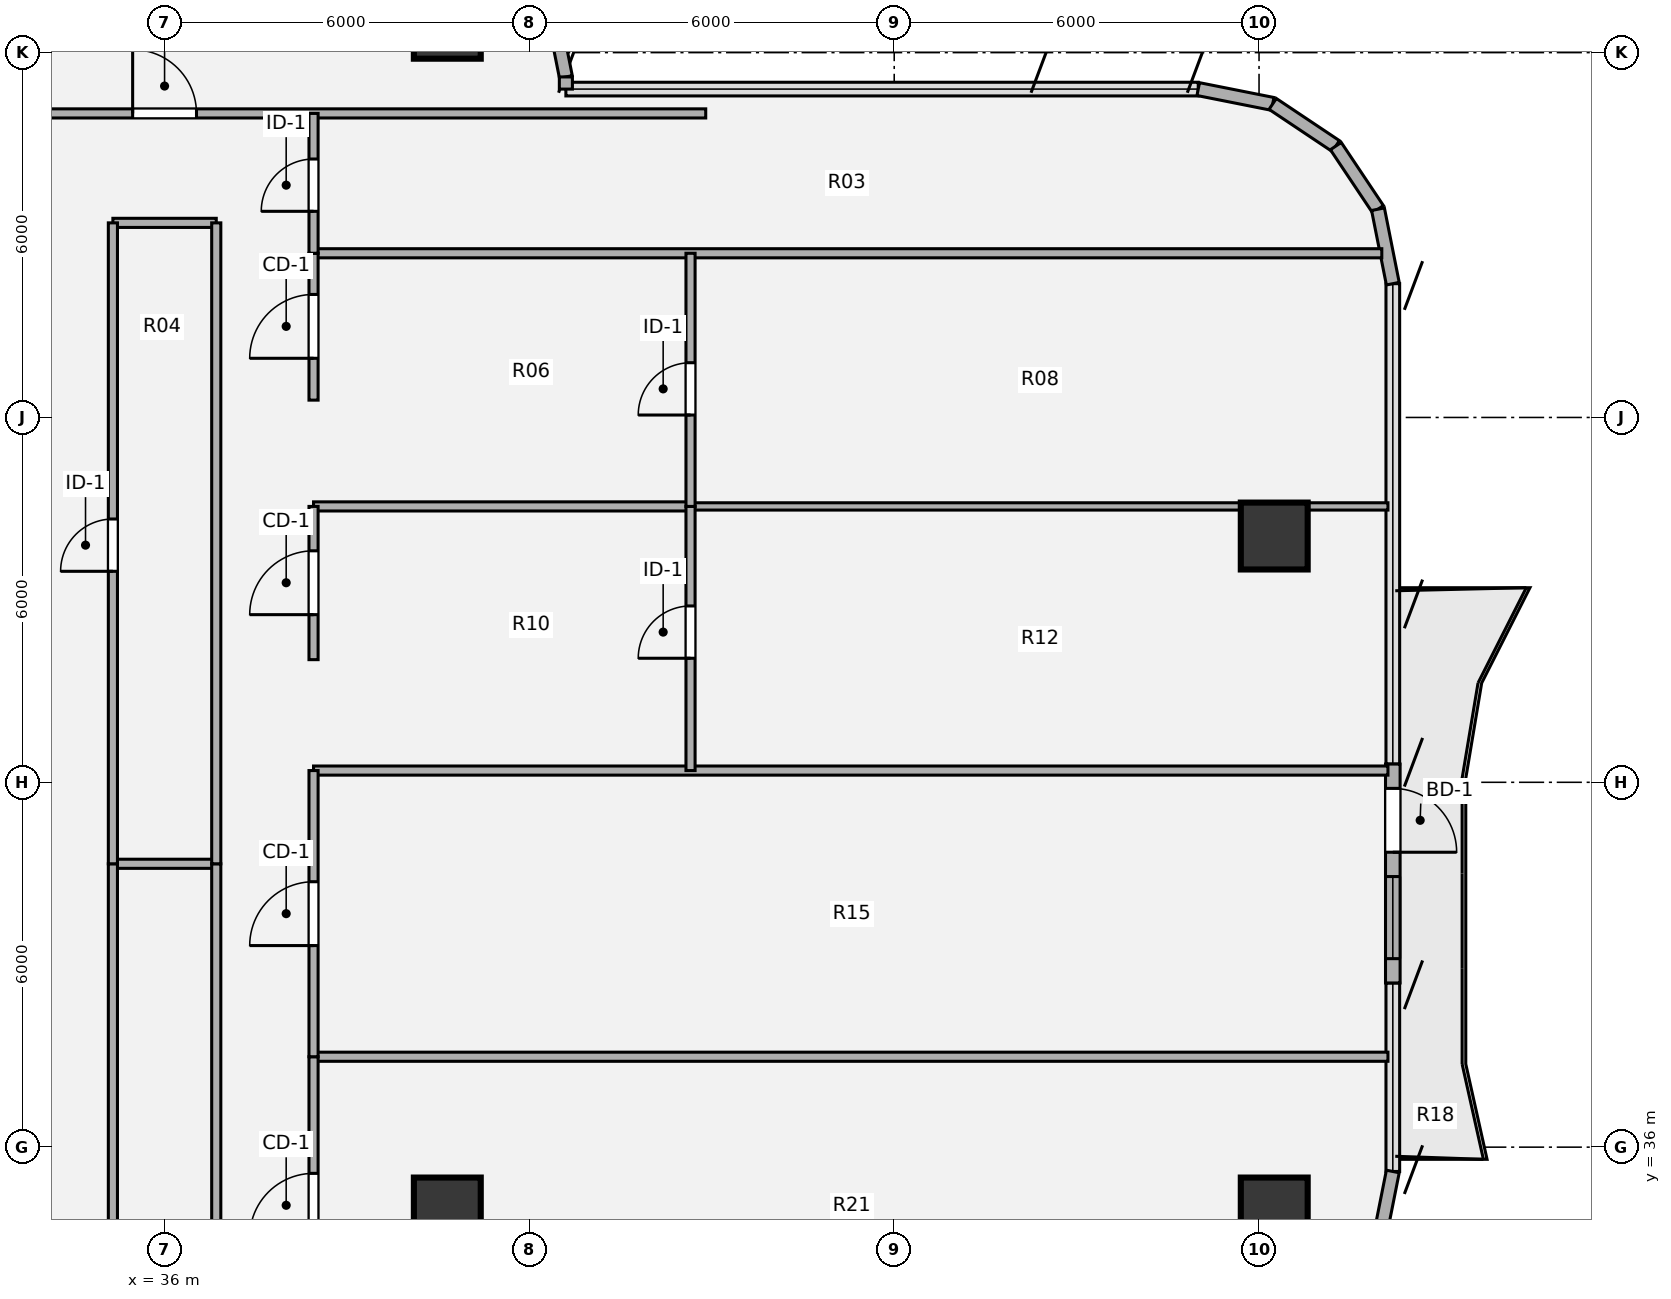
"""IFC4 building model, lengths in metres.
Left out: names, types, materials, properties, quantities, classifications, styles, units other than length and angle.
Written with IfcOpenShell. Run it as: python <this file> out.ifc"""

import sys

from ifc_helpers import new_model, si_unit, direction, frame, frame_2d, origin, origin_2d, place, context, subcontext, project, spatial, rectangle, hollow_circle, extrude, source, transform, mapped, element, fill, save


model = new_model("IFC4")
c1 = context("Model", 3, precision=1e-05, world=origin(), true_north=direction((0.0, 1.0)))
c2 = subcontext(c1, "Body", "Model", "MODEL_VIEW")
j1 = project(units=[si_unit("LENGTHUNIT", "METRE"), si_unit("PLANEANGLEUNIT", "RADIAN")], contexts=[c1])
p1 = place(None, origin())
s1 = spatial("IfcSite", under=j1, at=p1, CompositionType="ELEMENT")
p2 = place(p1, origin())
s2 = spatial("IfcBuilding", under=s1, at=p2, CompositionType="ELEMENT")
p3 = place(p2, frame((0.0, 0.0, 198.0)))
s3 = spatial("IfcBuildingStorey", under=s2, at=p3, CompositionType="ELEMENT", Elevation=198.0)
m1 = source(origin(), c2, "Body", "SweptSolid", [
    extrude(hollow_circle(Radius=0.55, WallThickness=0.04, at=origin_2d()), origin(), (0.0, 0.0, 1.0), 3.78),
])
for number, where, z_axis, x_axis in (
    (1, (54.25, 34.95, 0.0), (0.0, 0.0, 1.0), (1.0, 0.0, 0.0)),
    (2, (54.25, 46.05, 0.0), (0.0, 0.0, 1.0), (1.0, 0.0, 0.0)),
    (3, (40.65, 34.95, 0.0), (0.0, 0.0, 1.0), (1.0, 0.0, 0.0)),
    (4, (40.65, 54.45, 0.0), (0.0, 0.0, 1.0), (1.0, 0.0, 0.0)),
):
    element("IfcColumn", number, at=place(p3, frame(where, z_axis=z_axis, x_axis=x_axis)), inside=s3, PredefinedType="COLUMN", context=c2, shape_type="MappedRepresentation", body=[
        mapped(m1, transform((0.0, 0.0, 0.0), x_axis=(1.0, 0.0, 0.0), y_axis=(0.0, 1.0, 0.0), z_axis=(0.0, 0.0, 1.0), scale=1.0)),
    ])
p4 = place(p3, frame((42.387, 54.671, 0.0), z_axis=(0.0, 0.0, 1.0), x_axis=(0.195127417394, -0.980777900945, 0.0)))
e5 = element("IfcWall", 5, at=p4, inside=s3, PredefinedType="SOLIDWALL", context=c2, shape_type="SweptSolid", body=[
    extrude(rectangle(XDim=1.092, YDim=0.215, at=frame_2d((0.546, 0.0))), origin(), (0.0, 0.0, 1.0), 3.53),
])
p5 = place(p3, frame((42.6, 53.6, 0.0), z_axis=(0.0, 0.0, 1.0), x_axis=(0.0, -1.0, 0.0)))
e6 = element("IfcWall", 6, at=p5, inside=s3, PredefinedType="SOLIDWALL", context=c2, shape_type="SweptSolid", body=[
    extrude(rectangle(XDim=0.2, YDim=0.215, at=frame_2d((0.1, 0.0))), origin(), (0.0, 0.0, 1.0), 3.53),
])
for number, where, z_axis, x_axis in (
    (7, (53.0, 53.4, 0.0), (0.0, 0.0, 1.0), (0.981, -0.195, 0.0)),
    (8, (54.225, 53.156, 0.0), (0.0, 0.0, 1.0), (0.831, -0.556, 0.0)),
    (9, (55.263, 52.463, 0.0), (0.0, 0.0, 1.0), (0.556, -0.831, 0.0)),
    (10, (55.956, 51.425, 0.0), (0.0, 0.0, 1.0), (0.195, -0.981, 0.0)),
):
    element("IfcWall", number, at=place(p3, frame(where, z_axis=z_axis, x_axis=x_axis)), inside=s3, PredefinedType="SOLIDWALL", context=c2, shape_type="SweptSolid", body=[
        extrude(rectangle(XDim=1.249, YDim=0.215, at=frame_2d((0.624, 0.0))), origin(), (0.0, 0.0, 1.0), 3.53),
    ])
p6 = place(p3, frame((56.2, 42.3, 0.0), z_axis=(0.0, 0.0, 1.0), x_axis=(0.0, -1.0, 0.0)))
e11 = element("IfcWall", 11, at=p6, inside=s3, PredefinedType="SOLIDWALL", context=c2, shape_type="SweptSolid", body=[
    extrude(rectangle(XDim=3.6, YDim=0.24, at=frame_2d((1.8, 0.0))), origin(), (0.0, 0.0, 1.0), 3.53),
])
p7 = place(p6, frame((0.4, 0.0, 0.0)))
e12 = element("IfcOpeningElement", 12, at=p7, cuts=e11, PredefinedType="OPENING", context=c2, shape_type="SweptSolid", body=[
    extrude(rectangle(XDim=1.05, YDim=2.15, at=origin_2d()), frame((0.525, 0.13, 1.075), z_axis=(0.0, -1.0, 0.0), x_axis=(1.0, 0.0, 0.0)), (0.0, 0.0, 1.0), 0.26),
])
p8 = place(p6, frame((1.85, 0.0, 0.85)))
e13 = element("IfcOpeningElement", 13, at=p8, cuts=e11, PredefinedType="OPENING", context=c2, shape_type="SweptSolid", body=[
    extrude(rectangle(XDim=1.35, YDim=1.35, at=origin_2d()), frame((0.675, 0.13, 0.675), z_axis=(0.0, -1.0, 0.0), x_axis=(1.0, 0.0, 0.0)), (0.0, 0.0, 1.0), 0.26),
])
p9 = place(p3, frame((56.2, 35.6, 0.0), z_axis=(0.0, 0.0, 1.0), x_axis=(-0.195138390419, -0.980775717779, 0.0)))
e14 = element("IfcWall", 14, at=p9, inside=s3, PredefinedType="SOLIDWALL", context=c2, shape_type="SweptSolid", body=[
    extrude(rectangle(XDim=1.249, YDim=0.215, at=frame_2d((0.624, 0.0))), origin(), (0.0, 0.0, 1.0), 3.53),
])
p10 = place(p3, frame((38.45, 37.487, 0.0), z_axis=(0.0, 0.0, 1.0), x_axis=(1.0, 0.0, 0.0)))
e15 = element("IfcWall", 15, at=p10, inside=s3, PredefinedType="PARTITIONING", context=c2, shape_type="SweptSolid", body=[
    extrude(rectangle(XDim=17.67, YDim=0.15, at=frame_2d((8.835, 0.0))), origin(), (0.0, 0.0, 1.0), 3.055),
])
p11 = place(p3, frame((35.15, 40.66, 0.0), z_axis=(0.0, 0.0, 1.0), x_axis=(1.0, 0.0, 0.0)))
e16 = element("IfcWall", 16, at=p11, inside=s3, PredefinedType="PARTITIONING", context=c2, shape_type="SweptSolid", body=[
    extrude(rectangle(XDim=1.7, YDim=0.15, at=frame_2d((0.85, 0.0))), origin(), (0.0, 0.0, 1.0), 3.259),
])
p12 = place(p3, frame((38.45, 42.193, 0.0), z_axis=(0.0, 0.0, 1.0), x_axis=(1.0, 0.0, 0.0)))
e17 = element("IfcWall", 17, at=p12, inside=s3, PredefinedType="PARTITIONING", context=c2, shape_type="SweptSolid", body=[
    extrude(rectangle(XDim=17.67, YDim=0.15, at=frame_2d((8.835, 0.0))), origin(), (0.0, 0.0, 1.0), 2.982),
])
p13 = place(p3, frame((38.45, 46.537, 0.0), z_axis=(0.0, 0.0, 1.0), x_axis=(1.0, 0.0, 0.0)))
e18 = element("IfcWall", 18, at=p13, inside=s3, PredefinedType="PARTITIONING", context=c2, shape_type="SweptSolid", body=[
    extrude(rectangle(XDim=6.2, YDim=0.15, at=frame_2d((3.1, 0.0))), origin(), (0.0, 0.0, 1.0), 3.259),
])
p14 = place(p3, frame((44.65, 46.537, 0.0), z_axis=(0.0, 0.0, 1.0), x_axis=(1.0, 0.0, 0.0)))
e19 = element("IfcWall", 19, at=p14, inside=s3, PredefinedType="PARTITIONING", context=c2, shape_type="SweptSolid", body=[
    extrude(rectangle(XDim=11.47, YDim=0.12, at=frame_2d((5.735, 0.0))), origin(), (0.0, 0.0, 1.0), 3.5),
])
p15 = place(p3, frame((38.45, 50.7, 0.0), z_axis=(0.0, 0.0, 1.0), x_axis=(1.0, 0.0, 0.0)))
e20 = element("IfcWall", 20, at=p15, inside=s3, PredefinedType="PARTITIONING", context=c2, shape_type="SweptSolid", body=[
    extrude(rectangle(XDim=17.569, YDim=0.15, at=frame_2d((8.785, 0.0))), origin(), (0.0, 0.0, 1.0), 3.308),
])
p16 = place(p3, frame((35.15, 51.2, 0.0), z_axis=(0.0, 0.0, 1.0), x_axis=(1.0, 0.0, 0.0)))
e21 = element("IfcWall", 21, at=p16, inside=s3, PredefinedType="PARTITIONING", context=c2, shape_type="SweptSolid", body=[
    extrude(rectangle(XDim=1.7, YDim=0.15, at=frame_2d((0.85, 0.0))), origin(), (0.0, 0.0, 1.0), 3.308),
])
p17 = place(p3, frame((27.1, 53.0, 0.0), z_axis=(0.0, 0.0, 1.0), x_axis=(1.0, 0.0, 0.0)))
e22 = element("IfcWall", 22, at=p17, inside=s3, PredefinedType="PARTITIONING", context=c2, shape_type="SweptSolid", body=[
    extrude(rectangle(XDim=17.8, YDim=0.15, at=frame_2d((8.9, 0.0))), origin(), (0.0, 0.0, 1.0), 3.308),
])
p18 = place(p17, frame((8.375, 0.0, 0.0)))
e23 = element("IfcOpeningElement", 23, at=p18, cuts=e22, PredefinedType="OPENING", context=c2, shape_type="SweptSolid", body=[
    extrude(rectangle(XDim=1.05, YDim=2.1, at=origin_2d()), frame((0.525, 0.085, 1.05), z_axis=(0.0, -1.0, 0.0), x_axis=(1.0, 0.0, 0.0)), (0.0, 0.0, 1.0), 0.17),
])
p19 = place(p3, frame((35.15, 25.2, 0.0), z_axis=(0.0, 0.0, 1.0), x_axis=(0.0, 1.0, 0.0)))
e24 = element("IfcWall", 24, at=p19, inside=s3, PredefinedType="PARTITIONING", context=c2, shape_type="SweptSolid", body=[
    extrude(rectangle(XDim=15.46, YDim=0.15, at=frame_2d((7.73, 0.0))), origin(), (0.0, 0.0, 1.0), 3.5),
])
p20 = place(p3, frame((35.15, 40.66, 0.0), z_axis=(0.0, 0.0, 1.0), x_axis=(0.0, 1.0, 0.0)))
e25 = element("IfcWall", 25, at=p20, inside=s3, PredefinedType="PARTITIONING", context=c2, shape_type="SweptSolid", body=[
    extrude(rectangle(XDim=10.54, YDim=0.15, at=frame_2d((5.27, 0.0))), origin(), (0.0, 0.0, 1.0), 3.5),
])
p21 = place(p20, frame((4.81, 0.0, 0.0)))
e26 = element("IfcOpeningElement", 26, at=p21, cuts=e25, PredefinedType="OPENING", context=c2, shape_type="SweptSolid", body=[
    extrude(rectangle(XDim=0.86, YDim=2.1, at=origin_2d()), frame((0.43, 0.085, 1.05), z_axis=(0.0, -1.0, 0.0), x_axis=(1.0, 0.0, 0.0)), (0.0, 0.0, 1.0), 0.17),
])
p22 = place(p3, frame((36.85, 25.2, 0.0), z_axis=(0.0, 0.0, 1.0), x_axis=(0.0, 1.0, 0.0)))
e27 = element("IfcWall", 27, at=p22, inside=s3, PredefinedType="PARTITIONING", context=c2, shape_type="SweptSolid", body=[
    extrude(rectangle(XDim=15.46, YDim=0.15, at=frame_2d((7.73, 0.0))), origin(), (0.0, 0.0, 1.0), 3.5),
])
p23 = place(p22, frame((7.205, 0.0, 0.0)))
e28 = element("IfcOpeningElement", 28, at=p23, cuts=e27, PredefinedType="OPENING", context=c2, shape_type="SweptSolid", body=[
    extrude(rectangle(XDim=1.05, YDim=2.1, at=origin_2d()), frame((0.525, 0.085, 1.05), z_axis=(0.0, -1.0, 0.0), x_axis=(1.0, 0.0, 0.0)), (0.0, 0.0, 1.0), 0.17),
])
p24 = place(p3, frame((36.85, 40.66, 0.0), z_axis=(0.0, 0.0, 1.0), x_axis=(0.0, 1.0, 0.0)))
e29 = element("IfcWall", 29, at=p24, inside=s3, PredefinedType="PARTITIONING", context=c2, shape_type="SweptSolid", body=[
    extrude(rectangle(XDim=10.54, YDim=0.15, at=frame_2d((5.27, 0.0))), origin(), (0.0, 0.0, 1.0), 3.5),
])
p25 = place(p3, frame((38.45, 32.6, 0.0), z_axis=(0.0, 0.0, 1.0), x_axis=(0.0, 1.0, 0.0)))
e30 = element("IfcWall", 30, at=p25, inside=s3, PredefinedType="PARTITIONING", context=c2, shape_type="SweptSolid", body=[
    extrude(rectangle(XDim=4.887, YDim=0.15, at=frame_2d((2.443, 0.0))), origin(), (0.0, 0.0, 1.0), 3.5),
])
p26 = place(p25, frame((1.919, 0.0, 0.0)))
e31 = element("IfcOpeningElement", 31, at=p26, cuts=e30, PredefinedType="OPENING", context=c2, shape_type="SweptSolid", body=[
    extrude(rectangle(XDim=1.05, YDim=2.1, at=origin_2d()), frame((0.525, 0.085, 1.05), z_axis=(0.0, -1.0, 0.0), x_axis=(1.0, 0.0, 0.0)), (0.0, 0.0, 1.0), 0.17),
])
p27 = place(p3, frame((38.45, 37.487, 0.0), z_axis=(0.0, 0.0, 1.0), x_axis=(0.0, 1.0, 0.0)))
e32 = element("IfcWall", 32, at=p27, inside=s3, PredefinedType="PARTITIONING", context=c2, shape_type="SweptSolid", body=[
    extrude(rectangle(XDim=4.706, YDim=0.15, at=frame_2d((2.353, 0.0))), origin(), (0.0, 0.0, 1.0), 3.5),
])
p28 = place(p27, frame((1.828, 0.0, 0.0)))
e33 = element("IfcOpeningElement", 33, at=p28, cuts=e32, PredefinedType="OPENING", context=c2, shape_type="SweptSolid", body=[
    extrude(rectangle(XDim=1.05, YDim=2.1, at=origin_2d()), frame((0.525, 0.085, 1.05), z_axis=(0.0, -1.0, 0.0), x_axis=(1.0, 0.0, 0.0)), (0.0, 0.0, 1.0), 0.17),
])
p29 = place(p3, frame((38.45, 44.017, 0.0), z_axis=(0.0, 0.0, 1.0), x_axis=(0.0, 1.0, 0.0)))
e34 = element("IfcWall", 34, at=p29, inside=s3, PredefinedType="PARTITIONING", context=c2, shape_type="SweptSolid", body=[
    extrude(rectangle(XDim=2.52, YDim=0.15, at=frame_2d((1.26, 0.0))), origin(), (0.0, 0.0, 1.0), 3.5),
])
p30 = place(p29, frame((0.74, 0.0, 0.0)))
e35 = element("IfcOpeningElement", 35, at=p30, cuts=e34, PredefinedType="OPENING", context=c2, shape_type="SweptSolid", body=[
    extrude(rectangle(XDim=1.05, YDim=2.1, at=origin_2d()), frame((0.525, 0.085, 1.05), z_axis=(0.0, -1.0, 0.0), x_axis=(1.0, 0.0, 0.0)), (0.0, 0.0, 1.0), 0.17),
])
p31 = place(p3, frame((38.45, 48.285, 0.0), z_axis=(0.0, 0.0, 1.0), x_axis=(0.0, 1.0, 0.0)))
e36 = element("IfcWall", 36, at=p31, inside=s3, PredefinedType="PARTITIONING", context=c2, shape_type="SweptSolid", body=[
    extrude(rectangle(XDim=2.415, YDim=0.15, at=frame_2d((1.208, 0.0))), origin(), (0.0, 0.0, 1.0), 3.5),
])
p32 = place(p31, frame((0.688, 0.0, 0.0)))
e37 = element("IfcOpeningElement", 37, at=p32, cuts=e36, PredefinedType="OPENING", context=c2, shape_type="SweptSolid", body=[
    extrude(rectangle(XDim=1.05, YDim=2.1, at=origin_2d()), frame((0.525, 0.085, 1.05), z_axis=(0.0, -1.0, 0.0), x_axis=(1.0, 0.0, 0.0)), (0.0, 0.0, 1.0), 0.17),
])
p33 = place(p3, frame((38.45, 50.7, 0.0), z_axis=(0.0, 0.0, 1.0), x_axis=(0.0, 1.0, 0.0)))
e38 = element("IfcWall", 38, at=p33, inside=s3, PredefinedType="PARTITIONING", context=c2, shape_type="SweptSolid", body=[
    extrude(rectangle(XDim=2.3, YDim=0.15, at=frame_2d((1.15, 0.0))), origin(), (0.0, 0.0, 1.0), 3.5),
])
p34 = place(p33, frame((0.69, 0.0, 0.0)))
e39 = element("IfcOpeningElement", 39, at=p34, cuts=e38, PredefinedType="OPENING", context=c2, shape_type="SweptSolid", body=[
    extrude(rectangle(XDim=0.86, YDim=2.1, at=origin_2d()), frame((0.43, 0.085, 1.05), z_axis=(0.0, -1.0, 0.0), x_axis=(1.0, 0.0, 0.0)), (0.0, 0.0, 1.0), 0.17),
])
p35 = place(p3, frame((44.65, 42.193, 0.0), z_axis=(0.0, 0.0, 1.0), x_axis=(0.0, 1.0, 0.0)))
e40 = element("IfcWall", 40, at=p35, inside=s3, PredefinedType="PARTITIONING", context=c2, shape_type="SweptSolid", body=[
    extrude(rectangle(XDim=4.344, YDim=0.15, at=frame_2d((2.172, 0.0))), origin(), (0.0, 0.0, 1.0), 3.5),
])
p36 = place(p35, frame((1.847, 0.0, 0.0)))
e41 = element("IfcOpeningElement", 41, at=p36, cuts=e40, PredefinedType="OPENING", context=c2, shape_type="SweptSolid", body=[
    extrude(rectangle(XDim=0.86, YDim=2.1, at=origin_2d()), frame((0.43, 0.085, 1.05), z_axis=(0.0, -1.0, 0.0), x_axis=(1.0, 0.0, 0.0)), (0.0, 0.0, 1.0), 0.17),
])
p37 = place(p3, frame((44.65, 46.537, 0.0), z_axis=(0.0, 0.0, 1.0), x_axis=(0.0, 1.0, 0.0)))
e42 = element("IfcWall", 42, at=p37, inside=s3, PredefinedType="PARTITIONING", context=c2, shape_type="SweptSolid", body=[
    extrude(rectangle(XDim=4.163, YDim=0.15, at=frame_2d((2.082, 0.0))), origin(), (0.0, 0.0, 1.0), 3.5),
])
p38 = place(p37, frame((1.503, 0.0, 0.0)))
e43 = element("IfcOpeningElement", 43, at=p38, cuts=e42, PredefinedType="OPENING", context=c2, shape_type="SweptSolid", body=[
    extrude(rectangle(XDim=0.86, YDim=2.1, at=origin_2d()), frame((0.43, 0.085, 1.05), z_axis=(0.0, -1.0, 0.0), x_axis=(1.0, 0.0, 0.0)), (0.0, 0.0, 1.0), 0.17),
])
m2 = source(origin(), c2, "Body", "SweptSolid", [
    extrude(rectangle(XDim=1.05, YDim=2.15, at=origin_2d()), frame((0.525, 0.025, 1.075), z_axis=(0.0, -1.0, 0.0), x_axis=(1.0, 0.0, 0.0)), (0.0, 0.0, 1.0), 0.05),
])
p39 = place(p7, origin())
e44 = element("IfcDoor", 44, at=p39, inside=s3, OperationType="SINGLE_SWING_RIGHT", PredefinedType="DOOR", context=c2, shape_type="MappedRepresentation", body=[
    mapped(m2, transform((0.0, 0.0, 0.0), x_axis=(1.0, 0.0, 0.0), y_axis=(0.0, 1.0, 0.0), z_axis=(0.0, 0.0, 1.0), scale=1.0)),
])
fill(e12, e44)
m3 = source(origin(), c2, "Body", "SweptSolid", [
    extrude(rectangle(XDim=1.35, YDim=1.35, at=origin_2d()), frame((0.675, 0.03, 0.675), z_axis=(0.0, -1.0, 0.0), x_axis=(1.0, 0.0, 0.0)), (0.0, 0.0, 1.0), 0.06),
])
p40 = place(p8, origin())
e45 = element("IfcWindow", 45, at=p40, inside=s3, PartitioningType="SINGLE_PANEL", PredefinedType="WINDOW", context=c2, shape_type="MappedRepresentation", body=[
    mapped(m3, transform((0.0, 0.0, 0.0), x_axis=(1.0, 0.0, 0.0), y_axis=(0.0, 1.0, 0.0), z_axis=(0.0, 0.0, 1.0), scale=1.0)),
])
fill(e13, e45)
m4 = source(origin(), c2, "Body", "SweptSolid", [
    extrude(rectangle(XDim=1.05, YDim=2.1, at=origin_2d()), frame((0.525, 0.025, 1.05), z_axis=(0.0, -1.0, 0.0), x_axis=(1.0, 0.0, 0.0)), (0.0, 0.0, 1.0), 0.05),
])
p41 = place(p18, origin())
e46 = element("IfcDoor", 46, at=p41, inside=s3, OperationType="SINGLE_SWING_LEFT", PredefinedType="DOOR", context=c2, shape_type="MappedRepresentation", body=[
    mapped(m4, transform((0.0, 0.0, 0.0), x_axis=(1.0, 0.0, 0.0), y_axis=(0.0, 1.0, 0.0), z_axis=(0.0, 0.0, 1.0), scale=1.0)),
])
fill(e23, e46)
m5 = source(origin(), c2, "Body", "SweptSolid", [
    extrude(rectangle(XDim=0.86, YDim=2.1, at=origin_2d()), frame((0.43, 0.025, 1.05), z_axis=(0.0, -1.0, 0.0), x_axis=(1.0, 0.0, 0.0)), (0.0, 0.0, 1.0), 0.05),
])
p42 = place(p21, origin())
e47 = element("IfcDoor", 47, at=p42, inside=s3, OperationType="SINGLE_SWING_LEFT", PredefinedType="DOOR", context=c2, shape_type="MappedRepresentation", body=[
    mapped(m5, transform((0.0, 0.0, 0.0), x_axis=(1.0, 0.0, 0.0), y_axis=(0.0, 1.0, 0.0), z_axis=(0.0, 0.0, 1.0), scale=1.0)),
])
fill(e26, e47)
m6 = source(origin(), c2, "Body", "SweptSolid", [
    extrude(rectangle(XDim=1.05, YDim=2.1, at=origin_2d()), frame((0.525, 0.025, 1.05), z_axis=(0.0, -1.0, 0.0), x_axis=(1.0, 0.0, 0.0)), (0.0, 0.0, 1.0), 0.05),
])
p43 = place(p26, origin())
e48 = element("IfcDoor", 48, at=p43, inside=s3, OperationType="SINGLE_SWING_LEFT", PredefinedType="DOOR", context=c2, shape_type="MappedRepresentation", body=[
    mapped(m6, transform((0.0, 0.0, 0.0), x_axis=(1.0, 0.0, 0.0), y_axis=(0.0, 1.0, 0.0), z_axis=(0.0, 0.0, 1.0), scale=1.0)),
])
fill(e31, e48)
p44 = place(p28, origin())
e49 = element("IfcDoor", 49, at=p44, inside=s3, OperationType="SINGLE_SWING_LEFT", PredefinedType="DOOR", context=c2, shape_type="MappedRepresentation", body=[
    mapped(m6, transform((0.0, 0.0, 0.0), x_axis=(1.0, 0.0, 0.0), y_axis=(0.0, 1.0, 0.0), z_axis=(0.0, 0.0, 1.0), scale=1.0)),
])
fill(e33, e49)
p45 = place(p30, origin())
e50 = element("IfcDoor", 50, at=p45, inside=s3, OperationType="SINGLE_SWING_LEFT", PredefinedType="DOOR", context=c2, shape_type="MappedRepresentation", body=[
    mapped(m6, transform((0.0, 0.0, 0.0), x_axis=(1.0, 0.0, 0.0), y_axis=(0.0, 1.0, 0.0), z_axis=(0.0, 0.0, 1.0), scale=1.0)),
])
fill(e35, e50)
p46 = place(p32, origin())
e51 = element("IfcDoor", 51, at=p46, inside=s3, OperationType="SINGLE_SWING_LEFT", PredefinedType="DOOR", context=c2, shape_type="MappedRepresentation", body=[
    mapped(m6, transform((0.0, 0.0, 0.0), x_axis=(1.0, 0.0, 0.0), y_axis=(0.0, 1.0, 0.0), z_axis=(0.0, 0.0, 1.0), scale=1.0)),
])
fill(e37, e51)
p47 = place(p34, origin())
e52 = element("IfcDoor", 52, at=p47, inside=s3, OperationType="SINGLE_SWING_LEFT", PredefinedType="DOOR", context=c2, shape_type="MappedRepresentation", body=[
    mapped(m5, transform((0.0, 0.0, 0.0), x_axis=(1.0, 0.0, 0.0), y_axis=(0.0, 1.0, 0.0), z_axis=(0.0, 0.0, 1.0), scale=1.0)),
])
fill(e39, e52)
p48 = place(p36, origin())
e53 = element("IfcDoor", 53, at=p48, inside=s3, OperationType="SINGLE_SWING_LEFT", PredefinedType="DOOR", context=c2, shape_type="MappedRepresentation", body=[
    mapped(m5, transform((0.0, 0.0, 0.0), x_axis=(1.0, 0.0, 0.0), y_axis=(0.0, 1.0, 0.0), z_axis=(0.0, 0.0, 1.0), scale=1.0)),
])
fill(e41, e53)
p49 = place(p38, origin())
e54 = element("IfcDoor", 54, at=p49, inside=s3, OperationType="SINGLE_SWING_LEFT", PredefinedType="DOOR", context=c2, shape_type="MappedRepresentation", body=[
    mapped(m5, transform((0.0, 0.0, 0.0), x_axis=(1.0, 0.0, 0.0), y_axis=(0.0, 1.0, 0.0), z_axis=(0.0, 0.0, 1.0), scale=1.0)),
])
fill(e43, e54)
save(model, sys.argv[1])
